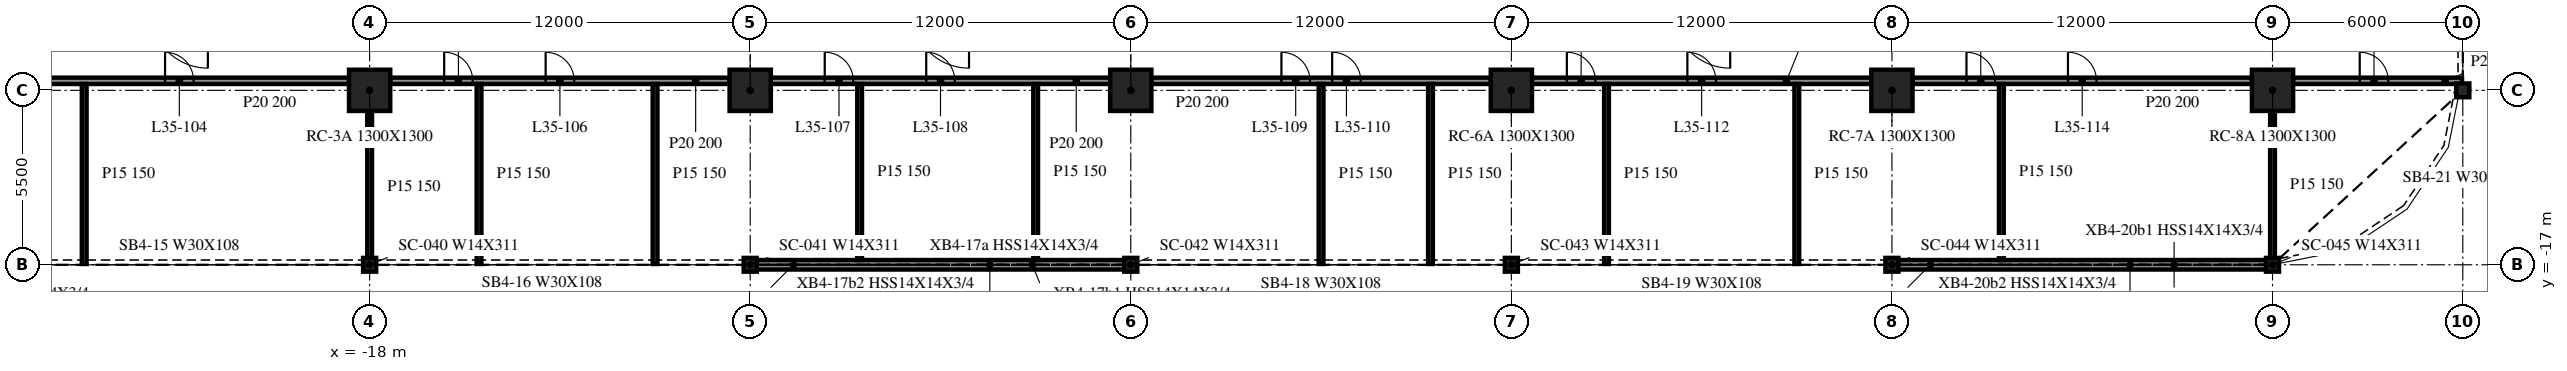
"""IFC4 building model, lengths in metres.
Left out: names, types, materials, properties, quantities, classifications, styles, units other than length and angle.
Written with IfcOpenShell. Run it as: python <this file> out.ifc"""

import sys

from ifc_helpers import new_model, si_unit, direction, frame, frame_2d, origin, origin_2d, place, context, subcontext, project, spatial, rectangle, i_section, extrude, element, fill, save


model = new_model("IFC4")
c1 = context("Model", 3, precision=1e-05, world=origin(), true_north=direction((0.0, 1.0)))
c2 = subcontext(c1, "Body", "Model", "MODEL_VIEW")
j1 = project(units=[si_unit("LENGTHUNIT", "METRE"), si_unit("PLANEANGLEUNIT", "RADIAN")], contexts=[c1])
p1 = place(None, origin())
s1 = spatial("IfcSite", under=j1, at=p1, CompositionType="ELEMENT")
p2 = place(p1, origin())
s2 = spatial("IfcBuilding", under=s1, at=p2, CompositionType="ELEMENT")
p3 = place(p2, frame((0.0, 0.0, 150.7)))
s3 = spatial("IfcBuildingStorey", under=s2, at=p3, CompositionType="ELEMENT", Elevation=150.7)
for number, where, z_axis, x_axis in (
    (1, (-18.0, -11.5, -0.34), (0.0, 0.0, 1.0), (1.0, 0.0, 0.0)),
    (2, (-6.0, -11.5, -0.34), (0.0, 0.0, 1.0), (1.0, 0.0, 0.0)),
    (3, (6.0, -11.5, -0.34), (0.0, 0.0, 1.0), (1.0, 0.0, 0.0)),
    (4, (18.0, -11.5, -0.34), (0.0, 0.0, 1.0), (1.0, 0.0, 0.0)),
    (5, (30.0, -11.5, -0.34), (0.0, 0.0, 1.0), (1.0, 0.0, 0.0)),
    (6, (42.0, -11.5, -0.34), (0.0, 0.0, 1.0), (1.0, 0.0, 0.0)),
):
    element("IfcColumn", number, at=place(p3, frame(where, z_axis=z_axis, x_axis=x_axis)), inside=s3, PredefinedType="COLUMN", context=c2, shape_type="SweptSolid", body=[
        extrude(rectangle(XDim=1.3, YDim=1.3, at=origin_2d()), origin(), (0.0, 0.0, 1.0), 3.89),
    ])
for number, where, z_axis, x_axis in (
    (7, (-18.0, -17.0, -0.34), (0.0, 0.0, 1.0), (1.0, 0.0, 0.0)),
    (8, (-6.0, -17.0, -0.34), (0.0, 0.0, 1.0), (1.0, 0.0, 0.0)),
    (9, (6.0, -17.0, -0.34), (0.0, 0.0, 1.0), (1.0, 0.0, 0.0)),
    (10, (18.0, -17.0, -0.34), (0.0, 0.0, 1.0), (1.0, 0.0, 0.0)),
    (11, (30.0, -17.0, -0.34), (0.0, 0.0, 1.0), (1.0, 0.0, 0.0)),
    (12, (42.0, -17.0, -0.34), (0.0, 0.0, 1.0), (1.0, 0.0, 0.0)),
    (13, (48.0, -11.5, -0.34), (0.0, 0.0, 1.0), (1.0, 0.0, 0.0)),
):
    element("IfcColumn", number, at=place(p3, frame(where, z_axis=z_axis, x_axis=x_axis)), inside=s3, PredefinedType="COLUMN", context=c2, shape_type="SweptSolid", body=[
        extrude(i_section(OverallWidth=0.412, OverallDepth=0.434, WebThickness=0.036, FlangeThickness=0.057, at=origin_2d()), origin(), (0.0, 0.0, 1.0), 3.89),
    ])
for number, where, z_axis, x_axis in (
    (14, (-5.982, -17.0, 0.0), (0.0, 0.0, 1.0), (1.0, 0.0, 0.0)),
    (15, (30.018, -17.0, 0.0), (0.0, 0.0, 1.0), (1.0, 0.0, 0.0)),
):
    element("IfcWall", number, at=place(p3, frame(where, z_axis=z_axis, x_axis=x_axis)), inside=s3, PredefinedType="NOTDEFINED", context=c2, shape_type="SweptSolid", body=[
        extrude(rectangle(XDim=11.964, YDim=0.3, at=frame_2d((5.982, 0.0))), origin(), (0.0, 0.0, 1.0), 3.55),
    ])
p4 = place(p3, frame((-29.35, -11.2, 0.0), z_axis=(0.0, 0.0, 1.0), x_axis=(1.0, 0.0, 0.0)))
e16 = element("IfcWall", 16, at=p4, inside=s3, PredefinedType="PARTITIONING", context=c2, shape_type="SweptSolid", body=[
    extrude(rectangle(XDim=10.7, YDim=0.2, at=frame_2d((5.35, 0.0))), origin(), (0.0, 0.0, 1.0), 3.55),
])
p5 = place(p4, frame((4.9, 0.0, 0.0)))
e17 = element("IfcOpeningElement", 17, at=p5, cuts=e16, PredefinedType="OPENING", context=c2, shape_type="SweptSolid", body=[
    extrude(rectangle(XDim=0.9, YDim=2.1, at=frame_2d((0.45, 1.05))), frame((0.0, 0.11, 0.0), z_axis=(0.0, -1.0, 0.0), x_axis=(1.0, 0.0, 0.0)), (0.0, 0.0, 1.0), 0.22),
])
p6 = place(p3, frame((-17.35, -11.2, 0.0), z_axis=(0.0, 0.0, 1.0), x_axis=(1.0, 0.0, 0.0)))
e18 = element("IfcWall", 18, at=p6, inside=s3, PredefinedType="PARTITIONING", context=c2, shape_type="SweptSolid", body=[
    extrude(rectangle(XDim=10.7, YDim=0.2, at=frame_2d((5.35, 0.0))), origin(), (0.0, 0.0, 1.0), 3.55),
])
p7 = place(p6, frame((1.7, 0.0, 0.0)))
e19 = element("IfcOpeningElement", 19, at=p7, cuts=e18, PredefinedType="OPENING", context=c2, shape_type="SweptSolid", body=[
    extrude(rectangle(XDim=0.9, YDim=2.1, at=frame_2d((0.45, 1.05))), frame((0.0, 0.11, 0.0), z_axis=(0.0, -1.0, 0.0), x_axis=(1.0, 0.0, 0.0)), (0.0, 0.0, 1.0), 0.22),
])
p8 = place(p6, frame((4.9, 0.0, 0.0)))
e20 = element("IfcOpeningElement", 20, at=p8, cuts=e18, PredefinedType="OPENING", context=c2, shape_type="SweptSolid", body=[
    extrude(rectangle(XDim=0.9, YDim=2.1, at=frame_2d((0.45, 1.05))), frame((0.0, 0.11, 0.0), z_axis=(0.0, -1.0, 0.0), x_axis=(1.0, 0.0, 0.0)), (0.0, 0.0, 1.0), 0.22),
])
p9 = place(p3, frame((-5.35, -11.2, 0.0), z_axis=(0.0, 0.0, 1.0), x_axis=(1.0, 0.0, 0.0)))
e21 = element("IfcWall", 21, at=p9, inside=s3, PredefinedType="PARTITIONING", context=c2, shape_type="SweptSolid", body=[
    extrude(rectangle(XDim=10.7, YDim=0.2, at=frame_2d((5.35, 0.0))), origin(), (0.0, 0.0, 1.0), 3.55),
])
p10 = place(p9, frame((1.7, 0.0, 0.0)))
e22 = element("IfcOpeningElement", 22, at=p10, cuts=e21, PredefinedType="OPENING", context=c2, shape_type="SweptSolid", body=[
    extrude(rectangle(XDim=0.9, YDim=2.1, at=frame_2d((0.45, 1.05))), frame((0.0, 0.11, 0.0), z_axis=(0.0, -1.0, 0.0), x_axis=(1.0, 0.0, 0.0)), (0.0, 0.0, 1.0), 0.22),
])
p11 = place(p9, frame((4.9, 0.0, 0.0)))
e23 = element("IfcOpeningElement", 23, at=p11, cuts=e21, PredefinedType="OPENING", context=c2, shape_type="SweptSolid", body=[
    extrude(rectangle(XDim=0.9, YDim=2.1, at=frame_2d((0.45, 1.05))), frame((0.0, 0.11, 0.0), z_axis=(0.0, -1.0, 0.0), x_axis=(1.0, 0.0, 0.0)), (0.0, 0.0, 1.0), 0.22),
])
p12 = place(p3, frame((6.65, -11.2, 0.0), z_axis=(0.0, 0.0, 1.0), x_axis=(1.0, 0.0, 0.0)))
e24 = element("IfcWall", 24, at=p12, inside=s3, PredefinedType="PARTITIONING", context=c2, shape_type="SweptSolid", body=[
    extrude(rectangle(XDim=10.7, YDim=0.2, at=frame_2d((5.35, 0.0))), origin(), (0.0, 0.0, 1.0), 3.55),
])
p13 = place(p12, frame((4.1, 0.0, 0.0)))
e25 = element("IfcOpeningElement", 25, at=p13, cuts=e24, PredefinedType="OPENING", context=c2, shape_type="SweptSolid", body=[
    extrude(rectangle(XDim=0.9, YDim=2.1, at=frame_2d((0.45, 1.05))), frame((0.0, 0.11, 0.0), z_axis=(0.0, -1.0, 0.0), x_axis=(1.0, 0.0, 0.0)), (0.0, 0.0, 1.0), 0.22),
])
p14 = place(p12, frame((5.7, 0.0, 0.0)))
e26 = element("IfcOpeningElement", 26, at=p14, cuts=e24, PredefinedType="OPENING", context=c2, shape_type="SweptSolid", body=[
    extrude(rectangle(XDim=0.9, YDim=2.1, at=frame_2d((0.45, 1.05))), frame((0.0, 0.11, 0.0), z_axis=(0.0, -1.0, 0.0), x_axis=(1.0, 0.0, 0.0)), (0.0, 0.0, 1.0), 0.22),
])
p15 = place(p3, frame((18.65, -11.2, 0.0), z_axis=(0.0, 0.0, 1.0), x_axis=(1.0, 0.0, 0.0)))
e27 = element("IfcWall", 27, at=p15, inside=s3, PredefinedType="PARTITIONING", context=c2, shape_type="SweptSolid", body=[
    extrude(rectangle(XDim=10.7, YDim=0.2, at=frame_2d((5.35, 0.0))), origin(), (0.0, 0.0, 1.0), 3.55),
])
p16 = place(p15, frame((1.1, 0.0, 0.0)))
e28 = element("IfcOpeningElement", 28, at=p16, cuts=e27, PredefinedType="OPENING", context=c2, shape_type="SweptSolid", body=[
    extrude(rectangle(XDim=0.9, YDim=2.1, at=frame_2d((0.45, 1.05))), frame((0.0, 0.11, 0.0), z_axis=(0.0, -1.0, 0.0), x_axis=(1.0, 0.0, 0.0)), (0.0, 0.0, 1.0), 0.22),
])
p17 = place(p15, frame((4.9, 0.0, 0.0)))
e29 = element("IfcOpeningElement", 29, at=p17, cuts=e27, PredefinedType="OPENING", context=c2, shape_type="SweptSolid", body=[
    extrude(rectangle(XDim=0.9, YDim=2.1, at=frame_2d((0.45, 1.05))), frame((0.0, 0.11, 0.0), z_axis=(0.0, -1.0, 0.0), x_axis=(1.0, 0.0, 0.0)), (0.0, 0.0, 1.0), 0.22),
])
p18 = place(p3, frame((30.65, -11.2, 0.0), z_axis=(0.0, 0.0, 1.0), x_axis=(1.0, 0.0, 0.0)))
e30 = element("IfcWall", 30, at=p18, inside=s3, PredefinedType="PARTITIONING", context=c2, shape_type="SweptSolid", body=[
    extrude(rectangle(XDim=10.7, YDim=0.2, at=frame_2d((5.35, 0.0))), origin(), (0.0, 0.0, 1.0), 3.55),
])
p19 = place(p18, frame((1.7, 0.0, 0.0)))
e31 = element("IfcOpeningElement", 31, at=p19, cuts=e30, PredefinedType="OPENING", context=c2, shape_type="SweptSolid", body=[
    extrude(rectangle(XDim=0.9, YDim=2.1, at=frame_2d((0.45, 1.05))), frame((0.0, 0.11, 0.0), z_axis=(0.0, -1.0, 0.0), x_axis=(1.0, 0.0, 0.0)), (0.0, 0.0, 1.0), 0.22),
])
p20 = place(p18, frame((4.9, 0.0, 0.0)))
e32 = element("IfcOpeningElement", 32, at=p20, cuts=e30, PredefinedType="OPENING", context=c2, shape_type="SweptSolid", body=[
    extrude(rectangle(XDim=0.9, YDim=2.1, at=frame_2d((0.45, 1.05))), frame((0.0, 0.11, 0.0), z_axis=(0.0, -1.0, 0.0), x_axis=(1.0, 0.0, 0.0)), (0.0, 0.0, 1.0), 0.22),
])
p21 = place(p3, frame((42.65, -11.2, 0.0), z_axis=(0.0, 0.0, 1.0), x_axis=(1.0, 0.0, 0.0)))
e33 = element("IfcWall", 33, at=p21, inside=s3, PredefinedType="PARTITIONING", context=c2, shape_type="SweptSolid", body=[
    extrude(rectangle(XDim=5.325, YDim=0.2, at=frame_2d((2.663, 0.0))), origin(), (0.0, 0.0, 1.0), 3.55),
])
p22 = place(p21, frame((2.1, 0.0, 0.0)))
e34 = element("IfcOpeningElement", 34, at=p22, cuts=e33, PredefinedType="OPENING", context=c2, shape_type="SweptSolid", body=[
    extrude(rectangle(XDim=0.9, YDim=2.1, at=frame_2d((0.45, 1.05))), frame((0.0, 0.11, 0.0), z_axis=(0.0, -1.0, 0.0), x_axis=(1.0, 0.0, 0.0)), (0.0, 0.0, 1.0), 0.22),
])
p23 = place(p3, frame((-27.0, -16.975, 0.0), z_axis=(0.0, 0.0, 1.0), x_axis=(0.0, 1.0, 0.0)))
e35 = element("IfcWall", 35, at=p23, inside=s3, PredefinedType="PARTITIONING", context=c2, shape_type="SweptSolid", body=[
    extrude(rectangle(XDim=5.675, YDim=0.15, at=frame_2d((2.837, 0.0))), origin(), (0.0, 0.0, 1.0), 3.55),
])
p24 = place(p3, frame((-18.0, -16.975, 0.0), z_axis=(0.0, 0.0, 1.0), x_axis=(0.0, 1.0, 0.0)))
e36 = element("IfcWall", 36, at=p24, inside=s3, PredefinedType="PARTITIONING", context=c2, shape_type="SweptSolid", body=[
    extrude(rectangle(XDim=4.825, YDim=0.15, at=frame_2d((2.413, 0.0))), origin(), (0.0, 0.0, 1.0), 2.551),
])
for number, where, z_axis, x_axis in (
    (37, (-14.55, -16.975, 0.0), (0.0, 0.0, 1.0), (0.0, 1.0, 0.0)),
    (38, (-9.0, -16.975, 0.0), (0.0, 0.0, 1.0), (0.0, 1.0, 0.0)),
):
    element("IfcWall", number, at=place(p3, frame(where, z_axis=z_axis, x_axis=x_axis)), inside=s3, PredefinedType="PARTITIONING", context=c2, shape_type="SweptSolid", body=[
        extrude(rectangle(XDim=5.675, YDim=0.15, at=frame_2d((2.837, 0.0))), origin(), (0.0, 0.0, 1.0), 3.55),
    ])
for number, where, z_axis, x_axis in (
    (39, (-2.55, -16.85, 0.0), (0.0, 0.0, 1.0), (0.0, 1.0, 0.0)),
    (40, (3.0, -16.85, 0.0), (0.0, 0.0, 1.0), (0.0, 1.0, 0.0)),
):
    element("IfcWall", number, at=place(p3, frame(where, z_axis=z_axis, x_axis=x_axis)), inside=s3, PredefinedType="PARTITIONING", context=c2, shape_type="SweptSolid", body=[
        extrude(rectangle(XDim=5.55, YDim=0.15, at=frame_2d((2.775, 0.0))), origin(), (0.0, 0.0, 1.0), 3.55),
    ])
for number, where, z_axis, x_axis in (
    (41, (12.0, -16.975, 0.0), (0.0, 0.0, 1.0), (0.0, 1.0, 0.0)),
    (42, (15.45, -16.975, 0.0), (0.0, 0.0, 1.0), (0.0, 1.0, 0.0)),
    (43, (21.0, -16.975, 0.0), (0.0, 0.0, 1.0), (0.0, 1.0, 0.0)),
    (44, (27.0, -16.975, 0.0), (0.0, 0.0, 1.0), (0.0, 1.0, 0.0)),
):
    element("IfcWall", number, at=place(p3, frame(where, z_axis=z_axis, x_axis=x_axis)), inside=s3, PredefinedType="PARTITIONING", context=c2, shape_type="SweptSolid", body=[
        extrude(rectangle(XDim=5.675, YDim=0.15, at=frame_2d((2.837, 0.0))), origin(), (0.0, 0.0, 1.0), 3.55),
    ])
p25 = place(p3, frame((33.45, -16.85, 0.0), z_axis=(0.0, 0.0, 1.0), x_axis=(0.0, 1.0, 0.0)))
e45 = element("IfcWall", 45, at=p25, inside=s3, PredefinedType="PARTITIONING", context=c2, shape_type="SweptSolid", body=[
    extrude(rectangle(XDim=5.55, YDim=0.15, at=frame_2d((2.775, 0.0))), origin(), (0.0, 0.0, 1.0), 3.55),
])
p26 = place(p3, frame((42.0, -16.847, 0.0), z_axis=(0.0, 0.0, 1.0), x_axis=(0.0, 1.0, 0.0)))
e46 = element("IfcWall", 46, at=p26, inside=s3, PredefinedType="PARTITIONING", context=c2, shape_type="SweptSolid", body=[
    extrude(rectangle(XDim=4.697, YDim=0.15, at=frame_2d((2.349, 0.0))), origin(), (0.0, 0.0, 1.0), 2.551),
])
p27 = place(p5, origin())
e47 = element("IfcDoor", 47, at=p27, inside=s3, OperationType="SINGLE_SWING_RIGHT", PredefinedType="DOOR", context=c2, shape_type="SweptSolid", body=[
    extrude(rectangle(XDim=0.9, YDim=2.1, at=frame_2d((0.45, 1.05))), frame((0.0, 0.025, 0.0), z_axis=(0.0, -1.0, 0.0), x_axis=(1.0, 0.0, 0.0)), (0.0, 0.0, 1.0), 0.05),
])
fill(e17, e47)
p28 = place(p7, origin())
e48 = element("IfcDoor", 48, at=p28, inside=s3, OperationType="SINGLE_SWING_RIGHT", PredefinedType="DOOR", context=c2, shape_type="SweptSolid", body=[
    extrude(rectangle(XDim=0.9, YDim=2.1, at=frame_2d((0.45, 1.05))), frame((0.0, 0.025, 0.0), z_axis=(0.0, -1.0, 0.0), x_axis=(1.0, 0.0, 0.0)), (0.0, 0.0, 1.0), 0.05),
])
fill(e19, e48)
p29 = place(p8, origin())
e49 = element("IfcDoor", 49, at=p29, inside=s3, OperationType="SINGLE_SWING_LEFT", PredefinedType="DOOR", context=c2, shape_type="SweptSolid", body=[
    extrude(rectangle(XDim=0.9, YDim=2.1, at=frame_2d((0.45, 1.05))), frame((0.0, 0.025, 0.0), z_axis=(0.0, -1.0, 0.0), x_axis=(1.0, 0.0, 0.0)), (0.0, 0.0, 1.0), 0.05),
])
fill(e20, e49)
p30 = place(p10, origin())
e50 = element("IfcDoor", 50, at=p30, inside=s3, OperationType="SINGLE_SWING_RIGHT", PredefinedType="DOOR", context=c2, shape_type="SweptSolid", body=[
    extrude(rectangle(XDim=0.9, YDim=2.1, at=frame_2d((0.45, 1.05))), frame((0.0, 0.025, 0.0), z_axis=(0.0, -1.0, 0.0), x_axis=(1.0, 0.0, 0.0)), (0.0, 0.0, 1.0), 0.05),
])
fill(e22, e50)
p31 = place(p11, origin())
e51 = element("IfcDoor", 51, at=p31, inside=s3, OperationType="SINGLE_SWING_LEFT", PredefinedType="DOOR", context=c2, shape_type="SweptSolid", body=[
    extrude(rectangle(XDim=0.9, YDim=2.1, at=frame_2d((0.45, 1.05))), frame((0.0, 0.025, 0.0), z_axis=(0.0, -1.0, 0.0), x_axis=(1.0, 0.0, 0.0)), (0.0, 0.0, 1.0), 0.05),
])
fill(e23, e51)
p32 = place(p13, origin())
e52 = element("IfcDoor", 52, at=p32, inside=s3, OperationType="SINGLE_SWING_RIGHT", PredefinedType="DOOR", context=c2, shape_type="SweptSolid", body=[
    extrude(rectangle(XDim=0.9, YDim=2.1, at=frame_2d((0.45, 1.05))), frame((0.0, 0.025, 0.0), z_axis=(0.0, -1.0, 0.0), x_axis=(1.0, 0.0, 0.0)), (0.0, 0.0, 1.0), 0.05),
])
fill(e25, e52)
p33 = place(p14, origin())
e53 = element("IfcDoor", 53, at=p33, inside=s3, OperationType="SINGLE_SWING_LEFT", PredefinedType="DOOR", context=c2, shape_type="SweptSolid", body=[
    extrude(rectangle(XDim=0.9, YDim=2.1, at=frame_2d((0.45, 1.05))), frame((0.0, 0.025, 0.0), z_axis=(0.0, -1.0, 0.0), x_axis=(1.0, 0.0, 0.0)), (0.0, 0.0, 1.0), 0.05),
])
fill(e26, e53)
p34 = place(p16, origin())
e54 = element("IfcDoor", 54, at=p34, inside=s3, OperationType="SINGLE_SWING_RIGHT", PredefinedType="DOOR", context=c2, shape_type="SweptSolid", body=[
    extrude(rectangle(XDim=0.9, YDim=2.1, at=frame_2d((0.45, 1.05))), frame((0.0, 0.025, 0.0), z_axis=(0.0, -1.0, 0.0), x_axis=(1.0, 0.0, 0.0)), (0.0, 0.0, 1.0), 0.05),
])
fill(e28, e54)
p35 = place(p17, origin())
e55 = element("IfcDoor", 55, at=p35, inside=s3, OperationType="SINGLE_SWING_RIGHT", PredefinedType="DOOR", context=c2, shape_type="SweptSolid", body=[
    extrude(rectangle(XDim=0.9, YDim=2.1, at=frame_2d((0.45, 1.05))), frame((0.0, 0.025, 0.0), z_axis=(0.0, -1.0, 0.0), x_axis=(1.0, 0.0, 0.0)), (0.0, 0.0, 1.0), 0.05),
])
fill(e29, e55)
p36 = place(p19, origin())
e56 = element("IfcDoor", 56, at=p36, inside=s3, OperationType="SINGLE_SWING_RIGHT", PredefinedType="DOOR", context=c2, shape_type="SweptSolid", body=[
    extrude(rectangle(XDim=0.9, YDim=2.1, at=frame_2d((0.45, 1.05))), frame((0.0, 0.025, 0.0), z_axis=(0.0, -1.0, 0.0), x_axis=(1.0, 0.0, 0.0)), (0.0, 0.0, 1.0), 0.05),
])
fill(e31, e56)
p37 = place(p20, origin())
e57 = element("IfcDoor", 57, at=p37, inside=s3, OperationType="SINGLE_SWING_RIGHT", PredefinedType="DOOR", context=c2, shape_type="SweptSolid", body=[
    extrude(rectangle(XDim=0.9, YDim=2.1, at=frame_2d((0.45, 1.05))), frame((0.0, 0.025, 0.0), z_axis=(0.0, -1.0, 0.0), x_axis=(1.0, 0.0, 0.0)), (0.0, 0.0, 1.0), 0.05),
])
fill(e32, e57)
p38 = place(p22, origin())
e58 = element("IfcDoor", 58, at=p38, inside=s3, OperationType="SINGLE_SWING_RIGHT", PredefinedType="DOOR", context=c2, shape_type="SweptSolid", body=[
    extrude(rectangle(XDim=0.9, YDim=2.1, at=frame_2d((0.45, 1.05))), frame((0.0, 0.025, 0.0), z_axis=(0.0, -1.0, 0.0), x_axis=(1.0, 0.0, 0.0)), (0.0, 0.0, 1.0), 0.05),
])
fill(e34, e58)
save(model, sys.argv[1])
